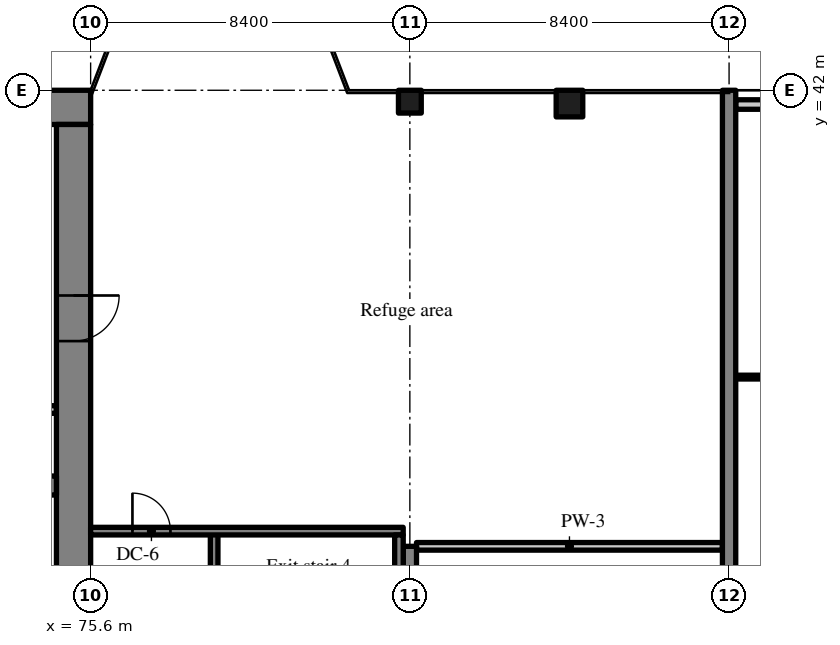
"""IFC4 building model, lengths in metres.
Left out: names, types, materials, properties, quantities, classifications, styles, units other than length and angle.
Written with IfcOpenShell. Run it as: python <this file> out.ifc"""

import sys

from ifc_helpers import new_model, si_unit, direction, frame, frame_2d, origin, origin_2d, place, context, subcontext, project, spatial, rectangle, extrude, source, transform, mapped, element, fill, save


model = new_model("IFC4")
c1 = context("Model", 3, precision=1e-05, world=origin(), true_north=direction((0.0, 1.0)))
c2 = subcontext(c1, "Body", "Model", "MODEL_VIEW")
j1 = project(units=[si_unit("LENGTHUNIT", "METRE"), si_unit("PLANEANGLEUNIT", "RADIAN")], contexts=[c1])
p1 = place(None, origin())
s1 = spatial("IfcSite", under=j1, at=p1, CompositionType="ELEMENT")
p2 = place(p1, origin())
s2 = spatial("IfcBuilding", under=s1, at=p2, CompositionType="ELEMENT")
p3 = place(p2, frame((0.0, 0.0, 121.8)))
s3 = spatial("IfcBuildingStorey", under=s2, at=p3, CompositionType="ELEMENT", Elevation=121.8)
m1 = source(origin(), c2, "Body", "SweptSolid", [
    extrude(rectangle(XDim=50.4, YDim=0.9, at=frame_2d((25.2, 0.0))), origin(), (0.0, 0.0, 1.0), 3.52),
])
p4 = place(p3, frame((25.2, 41.55, 0.0), z_axis=(0.0, 0.0, 1.0), x_axis=(1.0, 0.0, 0.0)))
e1 = element("IfcWall", 1, at=p4, inside=s3, PredefinedType="SHEAR", context=c2, shape_type="MappedRepresentation", body=[
    mapped(m1, transform((0.0, 0.0, 0.0), scale=1.0)),
])
m2 = source(origin(), c2, "Body", "SweptSolid", [
    extrude(rectangle(XDim=18.2, YDim=0.9, at=frame_2d((9.1, 0.0))), origin(), (0.0, 0.0, 1.0), 3.52),
])
p5 = place(p3, frame((75.15, 22.9, 0.0), z_axis=(0.0, 0.0, 1.0), x_axis=(0.0, 1.0, 0.0)))
e2 = element("IfcWall", 2, at=p5, inside=s3, PredefinedType="SHEAR", context=c2, shape_type="MappedRepresentation", body=[
    mapped(m2, transform((0.0, 0.0, 0.0), scale=1.0)),
])
m3 = source(origin(), c2, "Body", "SweptSolid", [
    extrude(rectangle(XDim=1.0, YDim=2.1, at=frame_2d((0.5, 1.05))), frame((0.0, 0.46, 0.0), z_axis=(0.0, -1.0, 0.0), x_axis=(1.0, 0.0, 0.0)), (0.0, 0.0, 1.0), 0.92),
])
p6 = place(p5, frame((2.6, 0.0, 0.0)))
e3 = element("IfcOpeningElement", 3, at=p6, cuts=e2, PredefinedType="OPENING", context=c2, shape_type="MappedRepresentation", body=[
    mapped(m3, transform((0.0, 0.0, 0.0), scale=1.0)),
])
m4 = source(origin(), c2, "Body", "SweptSolid", [
    extrude(rectangle(XDim=1.2, YDim=2.1, at=frame_2d((0.6, 1.05))), frame((0.0, 0.46, 0.0), z_axis=(0.0, -1.0, 0.0), x_axis=(1.0, 0.0, 0.0)), (0.0, 0.0, 1.0), 0.92),
])
p7 = place(p5, frame((12.5, 0.0, 0.0)))
e4 = element("IfcOpeningElement", 4, at=p7, cuts=e2, PredefinedType="OPENING", context=c2, shape_type="MappedRepresentation", body=[
    mapped(m4, transform((0.0, 0.0, 0.0), scale=1.0)),
])
m5 = source(origin(), c2, "Body", "SweptSolid", [
    extrude(rectangle(XDim=7.25, YDim=0.5, at=frame_2d((3.625, 0.0))), origin(), (0.0, 0.0, 1.0), 3.52),
])
p8 = place(p3, frame((67.45, 31.6, 0.0), z_axis=(0.0, 0.0, 1.0), x_axis=(1.0, 0.0, 0.0)))
e5 = element("IfcWall", 5, at=p8, inside=s3, PredefinedType="SHEAR", context=c2, shape_type="MappedRepresentation", body=[
    mapped(m5, transform((0.0, 0.0, 0.0), scale=1.0)),
])
m6 = source(origin(), c2, "Body", "SweptSolid", [
    extrude(rectangle(XDim=1.1, YDim=2.1, at=frame_2d((0.55, 1.05))), frame((0.0, 0.26, 0.0), z_axis=(0.0, -1.0, 0.0), x_axis=(1.0, 0.0, 0.0)), (0.0, 0.0, 1.0), 0.52),
])
p9 = place(p8, frame((5.575, 0.0, 0.0)))
e6 = element("IfcOpeningElement", 6, at=p9, cuts=e5, PredefinedType="OPENING", context=c2, shape_type="MappedRepresentation", body=[
    mapped(m6, transform((0.0, 0.0, 0.0), scale=1.0)),
])
m7 = source(origin(), c2, "Body", "SweptSolid", [
    extrude(rectangle(XDim=8.0, YDim=0.35, at=frame_2d((4.0, 0.0))), origin(), (0.0, 0.0, 1.0), 3.52),
])
p10 = place(p3, frame((84.0, 22.0, 0.0), z_axis=(0.0, 0.0, 1.0), x_axis=(0.0, 1.0, 0.0)))
e7 = element("IfcWall", 7, at=p10, inside=s3, PredefinedType="SHEAR", context=c2, shape_type="MappedRepresentation", body=[
    mapped(m7, transform((0.0, 0.0, 0.0), scale=1.0)),
])
m8 = source(origin(), c2, "Body", "SweptSolid", [
    extrude(rectangle(XDim=20.0, YDim=0.35, at=frame_2d((10.0, 0.0))), origin(), (0.0, 0.0, 1.0), 3.52),
])
p11 = place(p3, frame((92.4, 22.0, 0.0), z_axis=(0.0, 0.0, 1.0), x_axis=(0.0, 1.0, 0.0)))
e8 = element("IfcWall", 8, at=p11, inside=s3, PredefinedType="SHEAR", context=c2, shape_type="MappedRepresentation", body=[
    mapped(m8, transform((0.0, 0.0, 0.0), scale=1.0)),
])
m9 = source(origin(), c2, "Body", "SweptSolid", [
    extrude(rectangle(XDim=0.6, YDim=0.6, at=origin_2d()), origin(), (0.0, 0.0, 1.0), 3.52),
])
p12 = place(p3, frame((84.0, 41.7, 0.0), z_axis=(0.0, 0.0, 1.0), x_axis=(1.0, 0.0, 0.0)))
e9 = element("IfcColumn", 9, at=p12, inside=s3, PredefinedType="COLUMN", context=c2, shape_type="MappedRepresentation", body=[
    mapped(m9, transform((0.0, 0.0, 0.0), scale=1.0)),
])
m10 = source(origin(), c2, "Body", "SweptSolid", [
    extrude(rectangle(XDim=0.7, YDim=0.7, at=origin_2d()), origin(), (0.0, 0.0, 1.0), 3.52),
])
p13 = place(p3, frame((88.2, 41.65, 0.0), z_axis=(0.0, 0.0, 1.0), x_axis=(1.0, 0.0, 0.0)))
e10 = element("IfcColumn", 10, at=p13, inside=s3, PredefinedType="COLUMN", context=c2, shape_type="MappedRepresentation", body=[
    mapped(m10, transform((0.0, 0.0, 0.0), scale=1.0)),
])
m11 = source(origin(), c2, "Body", "SweptSolid", [
    extrude(rectangle(XDim=4.07, YDim=0.25, at=frame_2d((2.035, 0.0))), origin(), (0.0, 0.0, 1.0), 2.82),
])
p14 = place(p3, frame((96.645, 41.625, 0.0), z_axis=(0.0, 0.0, 1.0), x_axis=(-1.0, 0.0, 0.0)))
e11 = element("IfcWall", 11, at=p14, inside=s3, PredefinedType="SOLIDWALL", context=c2, shape_type="MappedRepresentation", body=[
    mapped(m11, transform((0.0, 0.0, 0.0), scale=1.0)),
])
m12 = source(origin(), c2, "Body", "SweptSolid", [
    extrude(rectangle(XDim=1.5, YDim=1.5, at=frame_2d((0.75, 0.75))), frame((0.0, 0.135, 0.0), z_axis=(0.0, -1.0, 0.0), x_axis=(1.0, 0.0, 0.0)), (0.0, 0.0, 1.0), 0.27),
])
p15 = place(p14, frame((1.285, 0.0, 0.9)))
e12 = element("IfcOpeningElement", 12, at=p15, cuts=e11, PredefinedType="OPENING", context=c2, shape_type="MappedRepresentation", body=[
    mapped(m12, transform((0.0, 0.0, 0.0), scale=1.0)),
])
m13 = source(origin(), c2, "Body", "SweptSolid", [
    extrude(rectangle(XDim=2.25, YDim=0.2, at=frame_2d((1.125, 0.0))), origin(), (0.0, 0.0, 1.0), 3.52),
])
p16 = place(p3, frame((72.45, 33.6, 0.0), z_axis=(0.0, 0.0, 1.0), x_axis=(1.0, 0.0, 0.0)))
e13 = element("IfcWall", 13, at=p16, inside=s3, PredefinedType="SOLIDWALL", context=c2, shape_type="MappedRepresentation", body=[
    mapped(m13, transform((0.0, 0.0, 0.0), scale=1.0)),
])
m14 = source(origin(), c2, "Body", "SweptSolid", [
    extrude(rectangle(XDim=8.3, YDim=0.2, at=frame_2d((4.15, 0.0))), origin(), (0.0, 0.0, 1.0), 3.52),
])
p17 = place(p3, frame((78.85, 22.1, 0.0), z_axis=(0.0, 0.0, 1.0), x_axis=(0.0, 1.0, 0.0)))
e14 = element("IfcWall", 14, at=p17, inside=s3, PredefinedType="SOLIDWALL", context=c2, shape_type="MappedRepresentation", body=[
    mapped(m14, transform((0.0, 0.0, 0.0), scale=1.0)),
])
m15 = source(origin(), c2, "Body", "SweptSolid", [
    extrude(rectangle(XDim=1.2, YDim=2.1, at=frame_2d((0.6, 1.05))), frame((0.0, 0.11, 0.0), z_axis=(0.0, -1.0, 0.0), x_axis=(1.0, 0.0, 0.0)), (0.0, 0.0, 1.0), 0.22),
])
p18 = place(p17, frame((0.6, 0.0, 0.0)))
e15 = element("IfcOpeningElement", 15, at=p18, cuts=e14, PredefinedType="OPENING", context=c2, shape_type="MappedRepresentation", body=[
    mapped(m15, transform((0.0, 0.0, 0.0), scale=1.0)),
])
m16 = source(origin(), c2, "Body", "SweptSolid", [
    extrude(rectangle(XDim=8.225, YDim=0.2, at=frame_2d((4.112, 0.0))), origin(), (0.0, 0.0, 1.0), 3.52),
])
p19 = place(p3, frame((83.825, 30.4, 0.0), z_axis=(0.0, 0.0, 1.0), x_axis=(-1.0, 0.0, 0.0)))
e16 = element("IfcWall", 16, at=p19, inside=s3, PredefinedType="SOLIDWALL", context=c2, shape_type="MappedRepresentation", body=[
    mapped(m16, transform((0.0, 0.0, 0.0), scale=1.0)),
])
m17 = source(origin(), c2, "Body", "SweptSolid", [
    extrude(rectangle(XDim=1.0, YDim=2.1, at=frame_2d((0.5, 1.05))), frame((0.0, 0.11, 0.0), z_axis=(0.0, -1.0, 0.0), x_axis=(1.0, 0.0, 0.0)), (0.0, 0.0, 1.0), 0.22),
])
p20 = place(p19, frame((6.125, 0.0, 0.0)))
e17 = element("IfcOpeningElement", 17, at=p20, cuts=e16, PredefinedType="OPENING", context=c2, shape_type="MappedRepresentation", body=[
    mapped(m17, transform((0.0, 0.0, 0.0), scale=1.0)),
])
m18 = source(origin(), c2, "Body", "SweptSolid", [
    extrude(rectangle(XDim=8.1, YDim=0.225, at=frame_2d((4.05, 0.0))), origin(), (0.0, 0.0, 1.0), 3.52),
])
p21 = place(p3, frame((83.713, 22.2, 0.0), z_axis=(0.0, 0.0, 1.0), x_axis=(0.0, 1.0, 0.0)))
e18 = element("IfcWall", 18, at=p21, inside=s3, PredefinedType="SOLIDWALL", context=c2, shape_type="MappedRepresentation", body=[
    mapped(m18, transform((0.0, 0.0, 0.0), scale=1.0)),
])
m19 = source(origin(), c2, "Body", "SweptSolid", [
    extrude(rectangle(XDim=8.05, YDim=0.2, at=frame_2d((4.025, 0.0))), origin(), (0.0, 0.0, 1.0), 3.52),
])
p22 = place(p3, frame((84.175, 30.0, 0.0), z_axis=(0.0, 0.0, 1.0), x_axis=(1.0, 0.0, 0.0)))
e19 = element("IfcWall", 19, at=p22, inside=s3, PredefinedType="PARTITIONING", context=c2, shape_type="MappedRepresentation", body=[
    mapped(m19, transform((0.0, 0.0, 0.0), scale=1.0)),
])
m20 = source(origin(), c2, "Body", "SweptSolid", [
    extrude(rectangle(XDim=7.875, YDim=0.1, at=frame_2d((3.938, 0.0))), origin(), (0.0, 0.0, 1.0), 3.52),
])
p23 = place(p3, frame((92.575, 34.453, 0.0), z_axis=(0.0, 0.0, 1.0), x_axis=(1.0, 0.0, 0.0)))
e20 = element("IfcWall", 20, at=p23, inside=s3, PredefinedType="PARTITIONING", context=c2, shape_type="MappedRepresentation", body=[
    mapped(m20, transform((0.0, 0.0, 0.0), scale=1.0)),
])
m21 = source(origin(), c2, "Body", "SweptSolid", [
    extrude(rectangle(XDim=1.8, YDim=2.1, at=frame_2d((0.9, 1.05))), frame((0.0, 0.06, 0.0), z_axis=(0.0, -1.0, 0.0), x_axis=(1.0, 0.0, 0.0)), (0.0, 0.0, 1.0), 0.12),
])
p24 = place(p23, frame((3.037, 0.0, 0.0)))
e21 = element("IfcOpeningElement", 21, at=p24, cuts=e20, PredefinedType="OPENING", context=c2, shape_type="MappedRepresentation", body=[
    mapped(m21, transform((0.0, 0.0, 0.0), scale=1.0)),
])
m22 = source(origin(), c2, "Body", "SweptSolid", [
    extrude(rectangle(XDim=1.2, YDim=2.1, at=frame_2d((0.6, 1.05))), frame((0.0, 0.025, 0.0), z_axis=(0.0, -1.0, 0.0), x_axis=(1.0, 0.0, 0.0)), (0.0, 0.0, 1.0), 0.05),
])
p25 = place(p7, origin())
e22 = element("IfcDoor", 22, at=p25, inside=s3, OperationType="SINGLE_SWING_RIGHT", PredefinedType="DOOR", context=c2, shape_type="MappedRepresentation", body=[
    mapped(m22, transform((0.0, 0.0, 0.0), scale=1.0)),
])
fill(e4, e22)
m23 = source(origin(), c2, "Body", "SweptSolid", [
    extrude(rectangle(XDim=1.0, YDim=2.1, at=frame_2d((0.5, 1.05))), frame((0.0, 0.025, 0.0), z_axis=(0.0, -1.0, 0.0), x_axis=(1.0, 0.0, 0.0)), (0.0, 0.0, 1.0), 0.05),
])
p26 = place(p20, origin())
e23 = element("IfcDoor", 23, at=p26, inside=s3, OperationType="SINGLE_SWING_RIGHT", PredefinedType="DOOR", context=c2, shape_type="MappedRepresentation", body=[
    mapped(m23, transform((0.0, 0.0, 0.0), scale=1.0)),
])
fill(e17, e23)
save(model, sys.argv[1])
